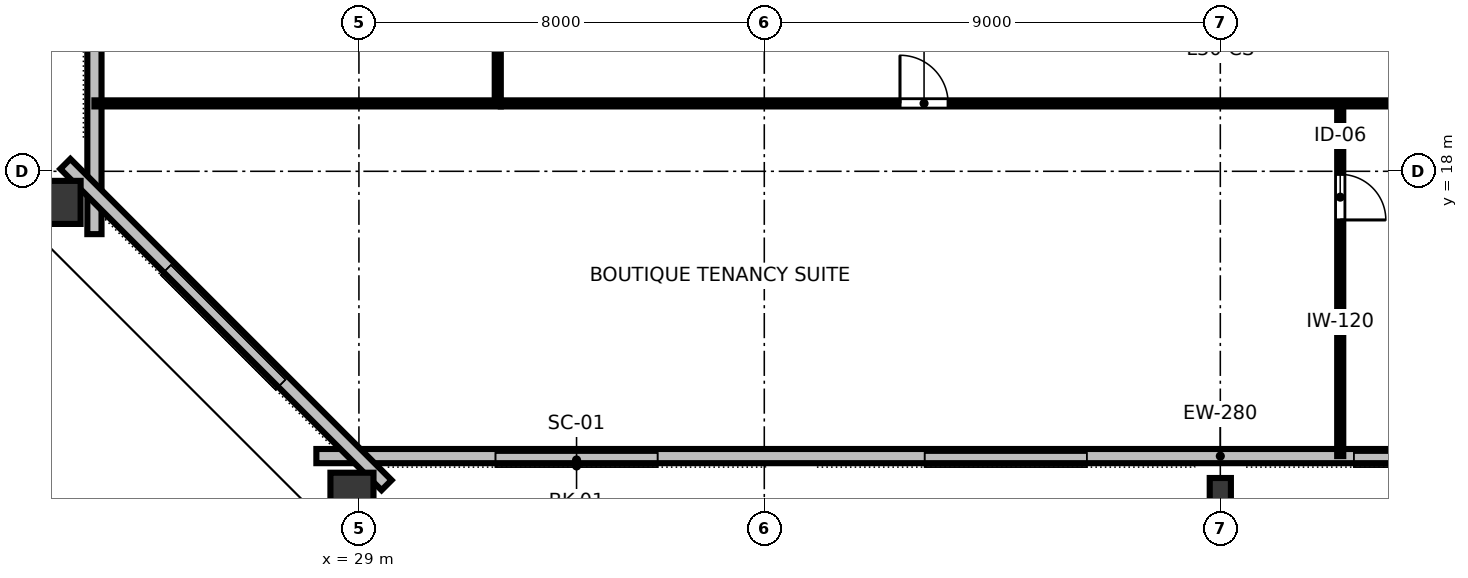
"""IFC4 building model, lengths in metres.
Left out: names, types, materials, properties, quantities, classifications, styles, units other than length and angle.
Written with IfcOpenShell. Run it as: python <this file> out.ifc"""

import sys

from ifc_helpers import new_model, si_unit, direction, frame, frame_2d, origin, origin_2d, place, context, subcontext, project, spatial, rectangle, hollow_rectangle, i_section, extrude, element, fill, save


model = new_model("IFC4")
c1 = context("Model", 3, precision=1e-05, world=origin(), true_north=direction((0.0, 1.0)))
c2 = subcontext(c1, "Body", "Model", "MODEL_VIEW")
j1 = project(units=[si_unit("LENGTHUNIT", "METRE"), si_unit("PLANEANGLEUNIT", "RADIAN")], contexts=[c1])
p1 = place(None, origin())
s1 = spatial("IfcSite", under=j1, at=p1, CompositionType="ELEMENT")
p2 = place(p1, origin())
s2 = spatial("IfcBuilding", under=s1, at=p2, CompositionType="ELEMENT")
p3 = place(p2, frame((0.0, 0.0, 116.8)))
s3 = spatial("IfcBuildingStorey", under=s2, at=p3, CompositionType="ELEMENT", Elevation=116.8)
p4 = place(p3, frame((28.863, 11.552, 0.0), z_axis=(0.0, 0.0, 1.0), x_axis=(1.0, 0.0, 0.0)))
e1 = element("IfcColumn", 1, at=p4, inside=s3, PredefinedType="COLUMN", context=c2, shape_type="SweptSolid", body=[
    extrude(hollow_rectangle(XDim=0.85, YDim=1.0, WallThickness=0.05, at=origin_2d()), origin(), (0.0, 0.0, 1.0), 3.358),
])
p5 = place(p3, frame((46.0, 11.72, 0.0), z_axis=(0.0, 0.0, 1.0), x_axis=(1.0, 0.0, 0.0)))
e2 = element("IfcColumn", 2, at=p5, inside=s3, PredefinedType="COLUMN", context=c2, shape_type="SweptSolid", body=[
    extrude(i_section(OverallWidth=0.418, OverallDepth=0.455, WebThickness=0.042, FlangeThickness=0.068, FilletRadius=0.025, at=origin_2d()), origin(), (0.0, 0.0, 1.0), 3.358),
])
p6 = place(p3, frame((23.008, 17.386, 0.0), z_axis=(0.0, 0.0, 1.0), x_axis=(0.0, 1.0, 0.0)))
e3 = element("IfcColumn", 3, at=p6, inside=s3, PredefinedType="COLUMN", context=c2, shape_type="SweptSolid", body=[
    extrude(hollow_rectangle(XDim=0.85, YDim=1.0, WallThickness=0.05, at=origin_2d()), origin(), (0.0, 0.0, 1.0), 3.358),
])
p7 = place(p3, frame((28.16, 12.38, 0.0), z_axis=(0.0, 0.0, 1.0), x_axis=(1.0, 0.0, 0.0)))
e4 = element("IfcWall", 4, at=p7, inside=s3, PredefinedType="STANDARD", context=c2, shape_type="SweptSolid", body=[
    extrude(rectangle(XDim=35.68, YDim=0.28, at=frame_2d((17.84, 0.0))), origin(), (0.0, 0.0, 1.0), 3.36),
])
p8 = place(p3, frame((23.78, 47.24, 0.0), z_axis=(0.0, 0.0, 1.0), x_axis=(0.0, -1.0, 0.0)))
e5 = element("IfcWall", 5, at=p8, inside=s3, PredefinedType="STANDARD", context=c2, shape_type="SweptSolid", body=[
    extrude(rectangle(XDim=30.48, YDim=0.28, at=frame_2d((15.24, 0.0))), origin(), (0.0, 0.0, 1.0), 3.36),
])
p9 = place(p3, frame((23.206, 18.146, 0.0), z_axis=(0.0, 0.0, 1.0), x_axis=(0.707106781187, -0.707106781187, 0.0)))
e6 = element("IfcWall", 6, at=p9, inside=s3, PredefinedType="STANDARD", context=c2, shape_type="SweptSolid", body=[
    extrude(rectangle(XDim=8.965, YDim=0.28, at=frame_2d((4.482, 0.0))), origin(), (0.0, 0.0, 1.0), 3.36),
])
p10 = place(p3, frame((48.366, 19.34, 0.0), z_axis=(0.0, 0.0, 1.0), x_axis=(0.0, -1.0, 0.0)))
e7 = element("IfcWall", 7, at=p10, inside=s3, PredefinedType="PARTITIONING", context=c2, shape_type="SweptSolid", body=[
    extrude(rectangle(XDim=6.96, YDim=0.12, at=frame_2d((3.48, 0.0))), origin(), (0.0, 0.0, 1.0), 2.64),
])
p11 = place(p10, frame((1.4, 0.0, 0.0)))
e8 = element("IfcOpeningElement", 8, at=p11, cuts=e7, PredefinedType="OPENING", context=c2, shape_type="SweptSolid", body=[
    extrude(rectangle(XDim=0.9, YDim=2.15, at=frame_2d((0.45, 1.075))), frame((0.0, 0.07, 0.0), z_axis=(0.0, -1.0, 0.0), x_axis=(1.0, 0.0, 0.0)), (0.0, 0.0, 1.0), 0.14),
])
p12 = place(p3, frame((31.8, 19.34, 0.0), z_axis=(0.0, 0.0, 1.0), x_axis=(1.0, 0.0, 0.0)))
e9 = element("IfcWall", 9, at=p12, inside=s3, PredefinedType="PARTITIONING", context=c2, shape_type="SweptSolid", body=[
    extrude(rectangle(XDim=28.4, YDim=0.12, at=frame_2d((14.2, 0.0))), origin(), (0.0, 0.0, 1.0), 2.64),
])
p13 = place(p12, frame((7.878, 0.0, 0.0)))
e10 = element("IfcOpeningElement", 10, at=p13, cuts=e9, PredefinedType="OPENING", context=c2, shape_type="SweptSolid", body=[
    extrude(rectangle(XDim=0.95, YDim=2.15, at=frame_2d((0.475, 1.075))), frame((0.0, 0.07, 0.0), z_axis=(0.0, -1.0, 0.0), x_axis=(1.0, 0.0, 0.0)), (0.0, 0.0, 1.0), 0.14),
])
p14 = place(p12, frame((21.938, 0.0, 0.0)))
e11 = element("IfcOpeningElement", 11, at=p14, cuts=e9, PredefinedType="OPENING", context=c2, shape_type="SweptSolid", body=[
    extrude(rectangle(XDim=0.95, YDim=2.15, at=frame_2d((0.475, 1.075))), frame((0.0, 0.07, 0.0), z_axis=(0.0, -1.0, 0.0), x_axis=(1.0, 0.0, 0.0)), (0.0, 0.0, 1.0), 0.14),
])
p15 = place(p3, frame((31.74, 19.4, 0.0), z_axis=(0.0, 0.0, 1.0), x_axis=(0.0, 1.0, 0.0)))
e12 = element("IfcWall", 12, at=p15, inside=s3, PredefinedType="PARTITIONING", context=c2, shape_type="SweptSolid", body=[
    extrude(rectangle(XDim=11.58, YDim=0.12, at=frame_2d((5.79, 0.0))), origin(), (0.0, 0.0, 1.0), 2.64),
])
p16 = place(p15, frame((2.616, 0.0, 0.0)))
e13 = element("IfcOpeningElement", 13, at=p16, cuts=e12, PredefinedType="OPENING", context=c2, shape_type="SweptSolid", body=[
    extrude(rectangle(XDim=0.95, YDim=2.15, at=frame_2d((0.475, 1.075))), frame((0.0, 0.07, 0.0), z_axis=(0.0, -1.0, 0.0), x_axis=(1.0, 0.0, 0.0)), (0.0, 0.0, 1.0), 0.14),
])
p17 = place(p15, frame((8.306, 0.0, 0.0)))
e14 = element("IfcOpeningElement", 14, at=p17, cuts=e12, PredefinedType="OPENING", context=c2, shape_type="SweptSolid", body=[
    extrude(rectangle(XDim=0.95, YDim=2.15, at=frame_2d((0.475, 1.075))), frame((0.0, 0.07, 0.0), z_axis=(0.0, -1.0, 0.0), x_axis=(1.0, 0.0, 0.0)), (0.0, 0.0, 1.0), 0.14),
])
p18 = place(p3, frame((31.8, 19.34, 0.0), z_axis=(0.0, 0.0, 1.0), x_axis=(-1.0, 0.0, 0.0)))
e15 = element("IfcWall", 15, at=p18, inside=s3, PredefinedType="PARTITIONING", context=c2, shape_type="SweptSolid", body=[
    extrude(rectangle(XDim=8.02, YDim=0.12, at=frame_2d((4.01, 0.0))), origin(), (0.0, 0.0, 1.0), 2.64),
])
p19 = place(p11, origin())
e16 = element("IfcDoor", 16, at=p19, inside=s3, OperationType="SINGLE_SWING_RIGHT", PredefinedType="DOOR", context=c2, shape_type="SweptSolid", body=[
    extrude(rectangle(XDim=0.9, YDim=2.15, at=frame_2d((0.45, 1.075))), frame((0.0, 0.025, 0.0), z_axis=(0.0, -1.0, 0.0), x_axis=(1.0, 0.0, 0.0)), (0.0, 0.0, 1.0), 0.05),
])
fill(e8, e16)
p20 = place(p13, origin())
e17 = element("IfcDoor", 17, at=p20, inside=s3, OperationType="SINGLE_SWING_LEFT", PredefinedType="DOOR", context=c2, shape_type="SweptSolid", body=[
    extrude(rectangle(XDim=0.95, YDim=2.15, at=frame_2d((0.475, 1.075))), frame((0.0, 0.025, 0.0), z_axis=(0.0, -1.0, 0.0), x_axis=(1.0, 0.0, 0.0)), (0.0, 0.0, 1.0), 0.05),
])
fill(e10, e17)
save(model, sys.argv[1])
